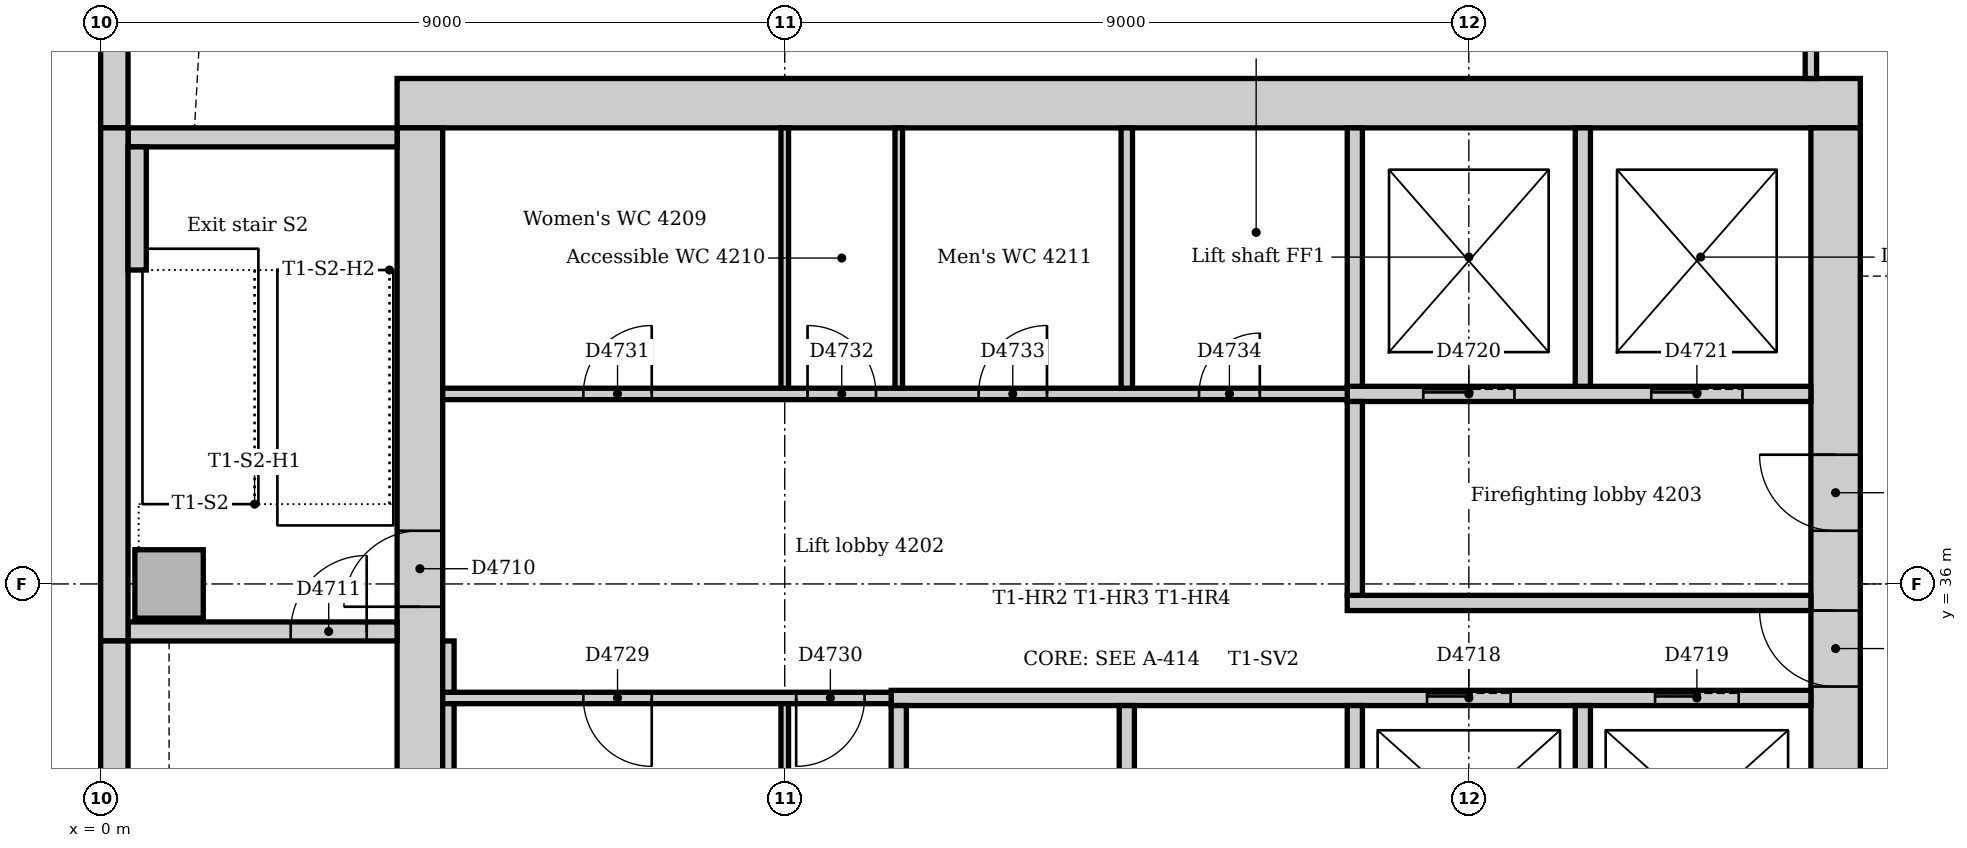
"""IFC4 building model, lengths in metres.
Left out: names, types, materials, properties, quantities, classifications, styles, units other than length and angle.
Written with IfcOpenShell. Run it as: python <this file> out.ifc"""

import sys

from ifc_helpers import new_model, si_unit, direction, frame, frame_2d, origin, origin_2d, place, context, subcontext, project, spatial, rectangle, extrude, element, fill, save


model = new_model("IFC4")
c1 = context("Model", 3, precision=1e-05, world=origin(), true_north=direction((0.0, 1.0)))
c2 = subcontext(c1, "Body", "Model", "MODEL_VIEW")
j1 = project(units=[si_unit("LENGTHUNIT", "METRE"), si_unit("PLANEANGLEUNIT", "RADIAN")], contexts=[c1])
p1 = place(None, origin())
s1 = spatial("IfcSite", under=j1, at=p1, CompositionType="ELEMENT")
p2 = place(p1, origin())
s2 = spatial("IfcBuilding", under=s1, at=p2, CompositionType="ELEMENT")
p3 = place(p2, frame((0.0, 0.0, 177.0)))
s3 = spatial("IfcBuildingStorey", under=s2, at=p3, CompositionType="ELEMENT", Elevation=177.0)
p4 = place(p3, frame((23.15, 42.325, 0.0), z_axis=(0.0, 0.0, 1.0), x_axis=(-1.0, 0.0, 0.0)))
e1 = element("IfcWall", 1, at=p4, inside=s3, PredefinedType="SOLIDWALL", context=c2, shape_type="SweptSolid", body=[
    extrude(rectangle(XDim=19.25, YDim=0.65, at=frame_2d((9.625, 0.0))), origin(), (0.0, 0.0, 1.0), 4.0),
])
p5 = place(p3, frame((22.825, 31.5, 0.0), z_axis=(0.0, 0.0, 1.0), x_axis=(0.0, 1.0, 0.0)))
e2 = element("IfcWall", 2, at=p5, inside=s3, PredefinedType="SOLIDWALL", context=c2, shape_type="SweptSolid", body=[
    extrude(rectangle(XDim=10.5, YDim=0.65, at=frame_2d((5.25, 0.0))), origin(), (0.0, 0.0, 1.0), 4.0),
])
p6 = place(p5, frame((3.15, 0.0, 0.0)))
e3 = element("IfcOpeningElement", 3, at=p6, cuts=e2, PredefinedType="OPENING", context=c2, shape_type="SweptSolid", body=[
    extrude(rectangle(XDim=1.0, YDim=2.1, at=frame_2d((0.5, 1.05))), frame((0.0, 0.335, 0.0), z_axis=(0.0, -1.0, 0.0), x_axis=(1.0, 0.0, 0.0)), (0.0, 0.0, 1.0), 0.67),
])
p7 = place(p5, frame((5.2, 0.0, 0.0)))
e4 = element("IfcOpeningElement", 4, at=p7, cuts=e2, PredefinedType="OPENING", context=c2, shape_type="SweptSolid", body=[
    extrude(rectangle(XDim=1.0, YDim=2.1, at=frame_2d((0.5, 1.05))), frame((0.0, 0.335, 0.0), z_axis=(0.0, -1.0, 0.0), x_axis=(1.0, 0.0, 0.0)), (0.0, 0.0, 1.0), 0.67),
])
p8 = place(p3, frame((4.2, 42.0, 0.0), z_axis=(0.0, 0.0, 1.0), x_axis=(0.0, -1.0, 0.0)))
e5 = element("IfcWall", 5, at=p8, inside=s3, PredefinedType="SOLIDWALL", context=c2, shape_type="SweptSolid", body=[
    extrude(rectangle(XDim=10.5, YDim=0.6, at=frame_2d((5.25, 0.0))), origin(), (0.0, 0.0, 1.0), 4.0),
])
p9 = place(p8, frame((5.3, 0.0, 0.0)))
e6 = element("IfcOpeningElement", 6, at=p9, cuts=e5, PredefinedType="OPENING", context=c2, shape_type="SweptSolid", body=[
    extrude(rectangle(XDim=1.0, YDim=2.1, at=frame_2d((0.5, 1.05))), frame((0.0, 0.31, 0.0), z_axis=(0.0, -1.0, 0.0), x_axis=(1.0, 0.0, 0.0)), (0.0, 0.0, 1.0), 0.62),
])
p10 = place(p3, frame((0.36, 35.375, 0.0), z_axis=(0.0, 0.0, 1.0), x_axis=(1.0, 0.0, 0.0)))
e7 = element("IfcWall", 7, at=p10, inside=s3, PredefinedType="SOLIDWALL", context=c2, shape_type="SweptSolid", body=[
    extrude(rectangle(XDim=3.54, YDim=0.25, at=frame_2d((1.77, 0.0))), origin(), (0.0, 0.0, 1.0), 4.0),
])
p11 = place(p10, frame((2.14, 0.0, 0.0)))
e8 = element("IfcOpeningElement", 8, at=p11, cuts=e7, PredefinedType="OPENING", context=c2, shape_type="SweptSolid", body=[
    extrude(rectangle(XDim=1.0, YDim=2.1, at=frame_2d((0.5, 1.05))), frame((0.0, 0.135, 0.0), z_axis=(0.0, -1.0, 0.0), x_axis=(1.0, 0.0, 0.0)), (0.0, 0.0, 1.0), 0.27),
])
p12 = place(p3, frame((3.9, 41.875, 0.0), z_axis=(0.0, 0.0, 1.0), x_axis=(-1.0, 0.0, 0.0)))
e9 = element("IfcWall", 9, at=p12, inside=s3, PredefinedType="SOLIDWALL", context=c2, shape_type="SweptSolid", body=[
    extrude(rectangle(XDim=3.54, YDim=0.25, at=frame_2d((1.77, 0.0))), origin(), (0.0, 0.0, 1.0), 4.0),
])
p13 = place(p3, frame((0.9, 36.0, 0.0), z_axis=(0.0, 0.0, 1.0), x_axis=(1.0, 0.0, 0.0)))
e10 = element("IfcColumn", 10, at=p13, inside=s3, PredefinedType="COLUMN", context=c2, shape_type="SweptSolid", body=[
    extrude(rectangle(XDim=0.9, YDim=0.9, at=origin_2d()), origin(), (0.0, 0.0, 1.0), 4.0),
])
p14 = place(p3, frame((0.18, 49.757, 0.0), z_axis=(0.0, 0.0, 1.0), x_axis=(0.0, -1.0, 0.0)))
e11 = element("IfcWall", 11, at=p14, inside=s3, PredefinedType="STANDARD", context=c2, shape_type="SweptSolid", body=[
    extrude(rectangle(XDim=7.757, YDim=0.36, at=frame_2d((3.879, 0.0))), origin(), (0.0, 0.0, 1.0), 3.85),
])
p15 = place(p14, frame((3.107, 0.0, 0.9)))
e12 = element("IfcOpeningElement", 12, at=p15, cuts=e11, PredefinedType="OPENING", context=c2, shape_type="SweptSolid", body=[
    extrude(rectangle(XDim=3.3, YDim=1.6, at=frame_2d((1.65, 0.8))), frame((0.0, 0.19, 0.0), z_axis=(0.0, -1.0, 0.0), x_axis=(1.0, 0.0, 0.0)), (0.0, 0.0, 1.0), 0.38),
])
p16 = place(p3, frame((0.18, 42.0, 0.0), z_axis=(0.0, 0.0, 1.0), x_axis=(0.0, -1.0, 0.0)))
e13 = element("IfcWall", 13, at=p16, inside=s3, PredefinedType="STANDARD", context=c2, shape_type="SweptSolid", body=[
    extrude(rectangle(XDim=6.75, YDim=0.36, at=frame_2d((3.375, 0.0))), origin(), (0.0, 0.0, 1.0), 3.85),
])
p17 = place(p3, frame((0.18, 35.25, 0.0), z_axis=(0.0, 0.0, 1.0), x_axis=(0.0, -1.0, 0.0)))
e14 = element("IfcWall", 14, at=p17, inside=s3, PredefinedType="STANDARD", context=c2, shape_type="SweptSolid", body=[
    extrude(rectangle(XDim=7.5, YDim=0.36, at=frame_2d((3.75, 0.0))), origin(), (0.0, 0.0, 1.0), 3.85),
])
p18 = place(p3, frame((0.48, 40.13, 0.0), z_axis=(0.0, 0.0, 1.0), x_axis=(0.0, 1.0, 0.0)))
e15 = element("IfcWall", 15, at=p18, inside=s3, PredefinedType="STANDARD", context=c2, shape_type="SweptSolid", body=[
    extrude(rectangle(XDim=1.62, YDim=0.24, at=frame_2d((0.81, 0.0))), origin(), (0.0, 0.0, 1.0), 4.0),
])
p19 = place(p3, frame((16.4, 35.75, 0.0), z_axis=(0.0, 0.0, 1.0), x_axis=(1.0, 0.0, 0.0)))
e16 = element("IfcWall", 16, at=p19, inside=s3, PredefinedType="PARTITIONING", context=c2, shape_type="SweptSolid", body=[
    extrude(rectangle(XDim=6.1, YDim=0.2, at=frame_2d((3.05, 0.0))), origin(), (0.0, 0.0, 1.0), 3.85),
])
p20 = place(p3, frame((16.4, 38.5, 0.0), z_axis=(0.0, 0.0, 1.0), x_axis=(1.0, 0.0, 0.0)))
e17 = element("IfcWall", 17, at=p20, inside=s3, PredefinedType="PARTITIONING", context=c2, shape_type="SweptSolid", body=[
    extrude(rectangle(XDim=6.1, YDim=0.2, at=frame_2d((3.05, 0.0))), origin(), (0.0, 0.0, 1.0), 3.85),
])
p21 = place(p20, frame((1.0, 0.0, 0.0)))
e18 = element("IfcOpeningElement", 18, at=p21, cuts=e17, PredefinedType="OPENING", context=c2, shape_type="SweptSolid", body=[
    extrude(rectangle(XDim=1.2, YDim=2.1, at=frame_2d((0.6, 1.05))), frame((0.0, 0.11, 0.0), z_axis=(0.0, -1.0, 0.0), x_axis=(1.0, 0.0, 0.0)), (0.0, 0.0, 1.0), 0.22),
])
p22 = place(p20, frame((4.0, 0.0, 0.0)))
e19 = element("IfcOpeningElement", 19, at=p22, cuts=e17, PredefinedType="OPENING", context=c2, shape_type="SweptSolid", body=[
    extrude(rectangle(XDim=1.2, YDim=2.1, at=frame_2d((0.6, 1.05))), frame((0.0, 0.11, 0.0), z_axis=(0.0, -1.0, 0.0), x_axis=(1.0, 0.0, 0.0)), (0.0, 0.0, 1.0), 0.22),
])
p23 = place(p3, frame((16.5, 35.85, 0.0), z_axis=(0.0, 0.0, 1.0), x_axis=(0.0, 1.0, 0.0)))
e20 = element("IfcWall", 20, at=p23, inside=s3, PredefinedType="PARTITIONING", context=c2, shape_type="SweptSolid", body=[
    extrude(rectangle(XDim=2.55, YDim=0.2, at=frame_2d((1.275, 0.0))), origin(), (0.0, 0.0, 1.0), 3.85),
])
p24 = place(p3, frame((10.4, 34.5, 0.0), z_axis=(0.0, 0.0, 1.0), x_axis=(1.0, 0.0, 0.0)))
e21 = element("IfcWall", 21, at=p24, inside=s3, PredefinedType="PARTITIONING", context=c2, shape_type="SweptSolid", body=[
    extrude(rectangle(XDim=12.1, YDim=0.2, at=frame_2d((6.05, 0.0))), origin(), (0.0, 0.0, 1.0), 3.85),
])
p25 = place(p24, frame((7.05, 0.0, 0.0)))
e22 = element("IfcOpeningElement", 22, at=p25, cuts=e21, PredefinedType="OPENING", context=c2, shape_type="SweptSolid", body=[
    extrude(rectangle(XDim=1.1, YDim=2.1, at=frame_2d((0.55, 1.05))), frame((0.0, 0.11, 0.0), z_axis=(0.0, -1.0, 0.0), x_axis=(1.0, 0.0, 0.0)), (0.0, 0.0, 1.0), 0.22),
])
p26 = place(p24, frame((10.05, 0.0, 0.0)))
e23 = element("IfcOpeningElement", 23, at=p26, cuts=e21, PredefinedType="OPENING", context=c2, shape_type="SweptSolid", body=[
    extrude(rectangle(XDim=1.1, YDim=2.1, at=frame_2d((0.55, 1.05))), frame((0.0, 0.11, 0.0), z_axis=(0.0, -1.0, 0.0), x_axis=(1.0, 0.0, 0.0)), (0.0, 0.0, 1.0), 0.22),
])
for number, where, z_axis, x_axis in (
    (24, (10.5, 31.75, 0.0), (0.0, 0.0, 1.0), (0.0, 1.0, 0.0)),
    (25, (13.5, 31.75, 0.0), (0.0, 0.0, 1.0), (0.0, 1.0, 0.0)),
    (26, (16.5, 31.75, 0.0), (0.0, 0.0, 1.0), (0.0, 1.0, 0.0)),
    (27, (19.5, 31.75, 0.0), (0.0, 0.0, 1.0), (0.0, 1.0, 0.0)),
):
    element("IfcWall", number, at=place(p3, frame(where, z_axis=z_axis, x_axis=x_axis)), inside=s3, PredefinedType="PARTITIONING", context=c2, shape_type="SweptSolid", body=[
        extrude(rectangle(XDim=2.65, YDim=0.2, at=frame_2d((1.325, 0.0))), origin(), (0.0, 0.0, 1.0), 3.85),
    ])
for number, where, z_axis, x_axis in (
    (28, (16.5, 38.6, 0.0), (0.0, 0.0, 1.0), (0.0, 1.0, 0.0)),
    (29, (19.5, 38.6, 0.0), (0.0, 0.0, 1.0), (0.0, 1.0, 0.0)),
):
    element("IfcWall", number, at=place(p3, frame(where, z_axis=z_axis, x_axis=x_axis)), inside=s3, PredefinedType="PARTITIONING", context=c2, shape_type="SweptSolid", body=[
        extrude(rectangle(XDim=3.4, YDim=0.2, at=frame_2d((1.7, 0.0))), origin(), (0.0, 0.0, 1.0), 3.85),
    ])
p27 = place(p3, frame((4.5, 38.5, 0.0), z_axis=(0.0, 0.0, 1.0), x_axis=(1.0, 0.0, 0.0)))
e30 = element("IfcWall", 30, at=p27, inside=s3, PredefinedType="PARTITIONING", context=c2, shape_type="SweptSolid", body=[
    extrude(rectangle(XDim=11.9, YDim=0.15, at=frame_2d((5.95, 0.0))), origin(), (0.0, 0.0, 1.0), 3.85),
])
p28 = place(p27, frame((1.85, 0.0, 0.0)))
e31 = element("IfcOpeningElement", 31, at=p28, cuts=e30, PredefinedType="OPENING", context=c2, shape_type="SweptSolid", body=[
    extrude(rectangle(XDim=0.9, YDim=2.1, at=frame_2d((0.45, 1.05))), frame((0.0, 0.085, 0.0), z_axis=(0.0, -1.0, 0.0), x_axis=(1.0, 0.0, 0.0)), (0.0, 0.0, 1.0), 0.17),
])
p29 = place(p27, frame((4.8, 0.0, 0.0)))
e32 = element("IfcOpeningElement", 32, at=p29, cuts=e30, PredefinedType="OPENING", context=c2, shape_type="SweptSolid", body=[
    extrude(rectangle(XDim=0.9, YDim=2.1, at=frame_2d((0.45, 1.05))), frame((0.0, 0.085, 0.0), z_axis=(0.0, -1.0, 0.0), x_axis=(1.0, 0.0, 0.0)), (0.0, 0.0, 1.0), 0.17),
])
p30 = place(p27, frame((7.05, 0.0, 0.0)))
e33 = element("IfcOpeningElement", 33, at=p30, cuts=e30, PredefinedType="OPENING", context=c2, shape_type="SweptSolid", body=[
    extrude(rectangle(XDim=0.9, YDim=2.1, at=frame_2d((0.45, 1.05))), frame((0.0, 0.085, 0.0), z_axis=(0.0, -1.0, 0.0), x_axis=(1.0, 0.0, 0.0)), (0.0, 0.0, 1.0), 0.17),
])
p31 = place(p27, frame((9.95, 0.0, 0.0)))
e34 = element("IfcOpeningElement", 34, at=p31, cuts=e30, PredefinedType="OPENING", context=c2, shape_type="SweptSolid", body=[
    extrude(rectangle(XDim=0.8, YDim=2.1, at=frame_2d((0.4, 1.05))), frame((0.0, 0.085, 0.0), z_axis=(0.0, -1.0, 0.0), x_axis=(1.0, 0.0, 0.0)), (0.0, 0.0, 1.0), 0.17),
])
p32 = place(p3, frame((4.5, 34.5, 0.0), z_axis=(0.0, 0.0, 1.0), x_axis=(1.0, 0.0, 0.0)))
e35 = element("IfcWall", 35, at=p32, inside=s3, PredefinedType="PARTITIONING", context=c2, shape_type="SweptSolid", body=[
    extrude(rectangle(XDim=5.9, YDim=0.15, at=frame_2d((2.95, 0.0))), origin(), (0.0, 0.0, 1.0), 3.85),
])
p33 = place(p32, frame((1.85, 0.0, 0.0)))
e36 = element("IfcOpeningElement", 36, at=p33, cuts=e35, PredefinedType="OPENING", context=c2, shape_type="SweptSolid", body=[
    extrude(rectangle(XDim=0.9, YDim=2.1, at=frame_2d((0.45, 1.05))), frame((0.0, 0.085, 0.0), z_axis=(0.0, -1.0, 0.0), x_axis=(1.0, 0.0, 0.0)), (0.0, 0.0, 1.0), 0.17),
])
p34 = place(p32, frame((4.65, 0.0, 0.0)))
e37 = element("IfcOpeningElement", 37, at=p34, cuts=e35, PredefinedType="OPENING", context=c2, shape_type="SweptSolid", body=[
    extrude(rectangle(XDim=0.9, YDim=2.1, at=frame_2d((0.45, 1.05))), frame((0.0, 0.085, 0.0), z_axis=(0.0, -1.0, 0.0), x_axis=(1.0, 0.0, 0.0)), (0.0, 0.0, 1.0), 0.17),
])
p35 = place(p3, frame((4.575, 34.575, 0.0), z_axis=(0.0, 0.0, 1.0), x_axis=(0.0, 1.0, 0.0)))
e38 = element("IfcWall", 38, at=p35, inside=s3, PredefinedType="PARTITIONING", context=c2, shape_type="SweptSolid", body=[
    extrude(rectangle(XDim=0.675, YDim=0.15, at=frame_2d((0.338, 0.0))), origin(), (0.0, 0.0, 1.0), 3.85),
])
p36 = place(p3, frame((4.575, 31.75, 0.0), z_axis=(0.0, 0.0, 1.0), x_axis=(0.0, 1.0, 0.0)))
e39 = element("IfcWall", 39, at=p36, inside=s3, PredefinedType="PARTITIONING", context=c2, shape_type="SweptSolid", body=[
    extrude(rectangle(XDim=2.675, YDim=0.15, at=frame_2d((1.337, 0.0))), origin(), (0.0, 0.0, 1.0), 3.85),
])
p37 = place(p3, frame((22.5, 42.65, 0.0), z_axis=(0.0, 0.0, 1.0), x_axis=(0.0, 1.0, 0.0)))
e40 = element("IfcWall", 40, at=p37, inside=s3, PredefinedType="PARTITIONING", context=c2, shape_type="SweptSolid", body=[
    extrude(rectangle(XDim=1.825, YDim=0.15, at=frame_2d((0.912, 0.0))), origin(), (0.0, 0.0, 1.0), 3.85),
])
p38 = place(p3, frame((13.5, 38.575, 0.0), z_axis=(0.0, 0.0, 1.0), x_axis=(0.0, 1.0, 0.0)))
e41 = element("IfcWall", 41, at=p38, inside=s3, PredefinedType="PARTITIONING", context=c2, shape_type="SweptSolid", body=[
    extrude(rectangle(XDim=3.425, YDim=0.15, at=frame_2d((1.712, 0.0))), origin(), (0.0, 0.0, 1.0), 3.85),
])
for number, where, z_axis, x_axis in (
    (42, (9.0, 38.575, 0.0), (0.0, 0.0, 1.0), (0.0, 1.0, 0.0)),
    (43, (10.5, 38.575, 0.0), (0.0, 0.0, 1.0), (0.0, 1.0, 0.0)),
):
    element("IfcWall", number, at=place(p3, frame(where, z_axis=z_axis, x_axis=x_axis)), inside=s3, PredefinedType="PARTITIONING", context=c2, shape_type="SweptSolid", body=[
        extrude(rectangle(XDim=3.425, YDim=0.1, at=frame_2d((1.712, 0.0))), origin(), (0.0, 0.0, 1.0), 3.85),
    ])
p39 = place(p3, frame((9.0, 31.75, 0.0), z_axis=(0.0, 0.0, 1.0), x_axis=(0.0, 1.0, 0.0)))
e44 = element("IfcWall", 44, at=p39, inside=s3, PredefinedType="PARTITIONING", context=c2, shape_type="SweptSolid", body=[
    extrude(rectangle(XDim=2.675, YDim=0.1, at=frame_2d((1.337, 0.0))), origin(), (0.0, 0.0, 1.0), 3.85),
])
p40 = place(p9, frame((1.0, 0.0, 0.0), z_axis=(0.0, 0.0, 1.0), x_axis=(-1.0, 0.0, 0.0)))
e45 = element("IfcDoor", 45, at=p40, inside=s3, OperationType="SINGLE_SWING_LEFT", PredefinedType="DOOR", context=c2, shape_type="SweptSolid", body=[
    extrude(rectangle(XDim=1.0, YDim=2.1, at=frame_2d((0.5, 1.05))), frame((0.0, 0.025, 0.0), z_axis=(0.0, -1.0, 0.0), x_axis=(1.0, 0.0, 0.0)), (0.0, 0.0, 1.0), 0.05),
])
fill(e6, e45)
p41 = place(p11, origin())
e46 = element("IfcDoor", 46, at=p41, inside=s3, OperationType="SINGLE_SWING_RIGHT", PredefinedType="DOOR", context=c2, shape_type="SweptSolid", body=[
    extrude(rectangle(XDim=1.0, YDim=2.1, at=frame_2d((0.5, 1.05))), frame((0.0, 0.025, 0.0), z_axis=(0.0, -1.0, 0.0), x_axis=(1.0, 0.0, 0.0)), (0.0, 0.0, 1.0), 0.05),
])
fill(e8, e46)
p42 = place(p25, origin())
e47 = element("IfcDoor", 47, at=p42, inside=s3, OperationType="SLIDING_TO_LEFT", PredefinedType="DOOR", context=c2, shape_type="SweptSolid", body=[
    extrude(rectangle(XDim=1.1, YDim=2.1, at=frame_2d((0.55, 1.05))), frame((0.0, 0.025, 0.0), z_axis=(0.0, -1.0, 0.0), x_axis=(1.0, 0.0, 0.0)), (0.0, 0.0, 1.0), 0.05),
])
fill(e22, e47)
p43 = place(p26, origin())
e48 = element("IfcDoor", 48, at=p43, inside=s3, OperationType="SLIDING_TO_LEFT", PredefinedType="DOOR", context=c2, shape_type="SweptSolid", body=[
    extrude(rectangle(XDim=1.1, YDim=2.1, at=frame_2d((0.55, 1.05))), frame((0.0, 0.025, 0.0), z_axis=(0.0, -1.0, 0.0), x_axis=(1.0, 0.0, 0.0)), (0.0, 0.0, 1.0), 0.05),
])
fill(e23, e48)
p44 = place(p21, origin())
e49 = element("IfcDoor", 49, at=p44, inside=s3, OperationType="SLIDING_TO_LEFT", PredefinedType="DOOR", context=c2, shape_type="SweptSolid", body=[
    extrude(rectangle(XDim=1.2, YDim=2.1, at=frame_2d((0.6, 1.05))), frame((0.0, 0.025, 0.0), z_axis=(0.0, -1.0, 0.0), x_axis=(1.0, 0.0, 0.0)), (0.0, 0.0, 1.0), 0.05),
])
fill(e18, e49)
p45 = place(p22, origin())
e50 = element("IfcDoor", 50, at=p45, inside=s3, OperationType="SLIDING_TO_LEFT", PredefinedType="DOOR", context=c2, shape_type="SweptSolid", body=[
    extrude(rectangle(XDim=1.2, YDim=2.1, at=frame_2d((0.6, 1.05))), frame((0.0, 0.025, 0.0), z_axis=(0.0, -1.0, 0.0), x_axis=(1.0, 0.0, 0.0)), (0.0, 0.0, 1.0), 0.05),
])
fill(e19, e50)
p46 = place(p6, origin())
e51 = element("IfcDoor", 51, at=p46, inside=s3, OperationType="SINGLE_SWING_RIGHT", PredefinedType="DOOR", context=c2, shape_type="SweptSolid", body=[
    extrude(rectangle(XDim=1.0, YDim=2.1, at=frame_2d((0.5, 1.05))), frame((0.0, 0.025, 0.0), z_axis=(0.0, -1.0, 0.0), x_axis=(1.0, 0.0, 0.0)), (0.0, 0.0, 1.0), 0.05),
])
fill(e3, e51)
p47 = place(p7, origin())
e52 = element("IfcDoor", 52, at=p47, inside=s3, OperationType="SINGLE_SWING_RIGHT", PredefinedType="DOOR", context=c2, shape_type="SweptSolid", body=[
    extrude(rectangle(XDim=1.0, YDim=2.1, at=frame_2d((0.5, 1.05))), frame((0.0, 0.025, 0.0), z_axis=(0.0, -1.0, 0.0), x_axis=(1.0, 0.0, 0.0)), (0.0, 0.0, 1.0), 0.05),
])
fill(e4, e52)
p48 = place(p33, frame((0.9, 0.0, 0.0), z_axis=(0.0, 0.0, 1.0), x_axis=(-1.0, 0.0, 0.0)))
e53 = element("IfcDoor", 53, at=p48, inside=s3, OperationType="SINGLE_SWING_LEFT", PredefinedType="DOOR", context=c2, shape_type="SweptSolid", body=[
    extrude(rectangle(XDim=0.9, YDim=2.1, at=frame_2d((0.45, 1.05))), frame((0.0, 0.025, 0.0), z_axis=(0.0, -1.0, 0.0), x_axis=(1.0, 0.0, 0.0)), (0.0, 0.0, 1.0), 0.05),
])
fill(e36, e53)
p49 = place(p34, frame((0.9, 0.0, 0.0), z_axis=(0.0, 0.0, 1.0), x_axis=(-1.0, 0.0, 0.0)))
e54 = element("IfcDoor", 54, at=p49, inside=s3, OperationType="SINGLE_SWING_RIGHT", PredefinedType="DOOR", context=c2, shape_type="SweptSolid", body=[
    extrude(rectangle(XDim=0.9, YDim=2.1, at=frame_2d((0.45, 1.05))), frame((0.0, 0.025, 0.0), z_axis=(0.0, -1.0, 0.0), x_axis=(1.0, 0.0, 0.0)), (0.0, 0.0, 1.0), 0.05),
])
fill(e37, e54)
p50 = place(p28, origin())
e55 = element("IfcDoor", 55, at=p50, inside=s3, OperationType="SINGLE_SWING_RIGHT", PredefinedType="DOOR", context=c2, shape_type="SweptSolid", body=[
    extrude(rectangle(XDim=0.9, YDim=2.1, at=frame_2d((0.45, 1.05))), frame((0.0, 0.025, 0.0), z_axis=(0.0, -1.0, 0.0), x_axis=(1.0, 0.0, 0.0)), (0.0, 0.0, 1.0), 0.05),
])
fill(e31, e55)
p51 = place(p29, origin())
e56 = element("IfcDoor", 56, at=p51, inside=s3, OperationType="SINGLE_SWING_LEFT", PredefinedType="DOOR", context=c2, shape_type="SweptSolid", body=[
    extrude(rectangle(XDim=0.9, YDim=2.1, at=frame_2d((0.45, 1.05))), frame((0.0, 0.025, 0.0), z_axis=(0.0, -1.0, 0.0), x_axis=(1.0, 0.0, 0.0)), (0.0, 0.0, 1.0), 0.05),
])
fill(e32, e56)
p52 = place(p30, origin())
e57 = element("IfcDoor", 57, at=p52, inside=s3, OperationType="SINGLE_SWING_RIGHT", PredefinedType="DOOR", context=c2, shape_type="SweptSolid", body=[
    extrude(rectangle(XDim=0.9, YDim=2.1, at=frame_2d((0.45, 1.05))), frame((0.0, 0.025, 0.0), z_axis=(0.0, -1.0, 0.0), x_axis=(1.0, 0.0, 0.0)), (0.0, 0.0, 1.0), 0.05),
])
fill(e33, e57)
p53 = place(p31, origin())
e58 = element("IfcDoor", 58, at=p53, inside=s3, OperationType="SINGLE_SWING_RIGHT", PredefinedType="DOOR", context=c2, shape_type="SweptSolid", body=[
    extrude(rectangle(XDim=0.8, YDim=2.1, at=frame_2d((0.4, 1.05))), frame((0.0, 0.025, 0.0), z_axis=(0.0, -1.0, 0.0), x_axis=(1.0, 0.0, 0.0)), (0.0, 0.0, 1.0), 0.05),
])
fill(e34, e58)
save(model, sys.argv[1])
